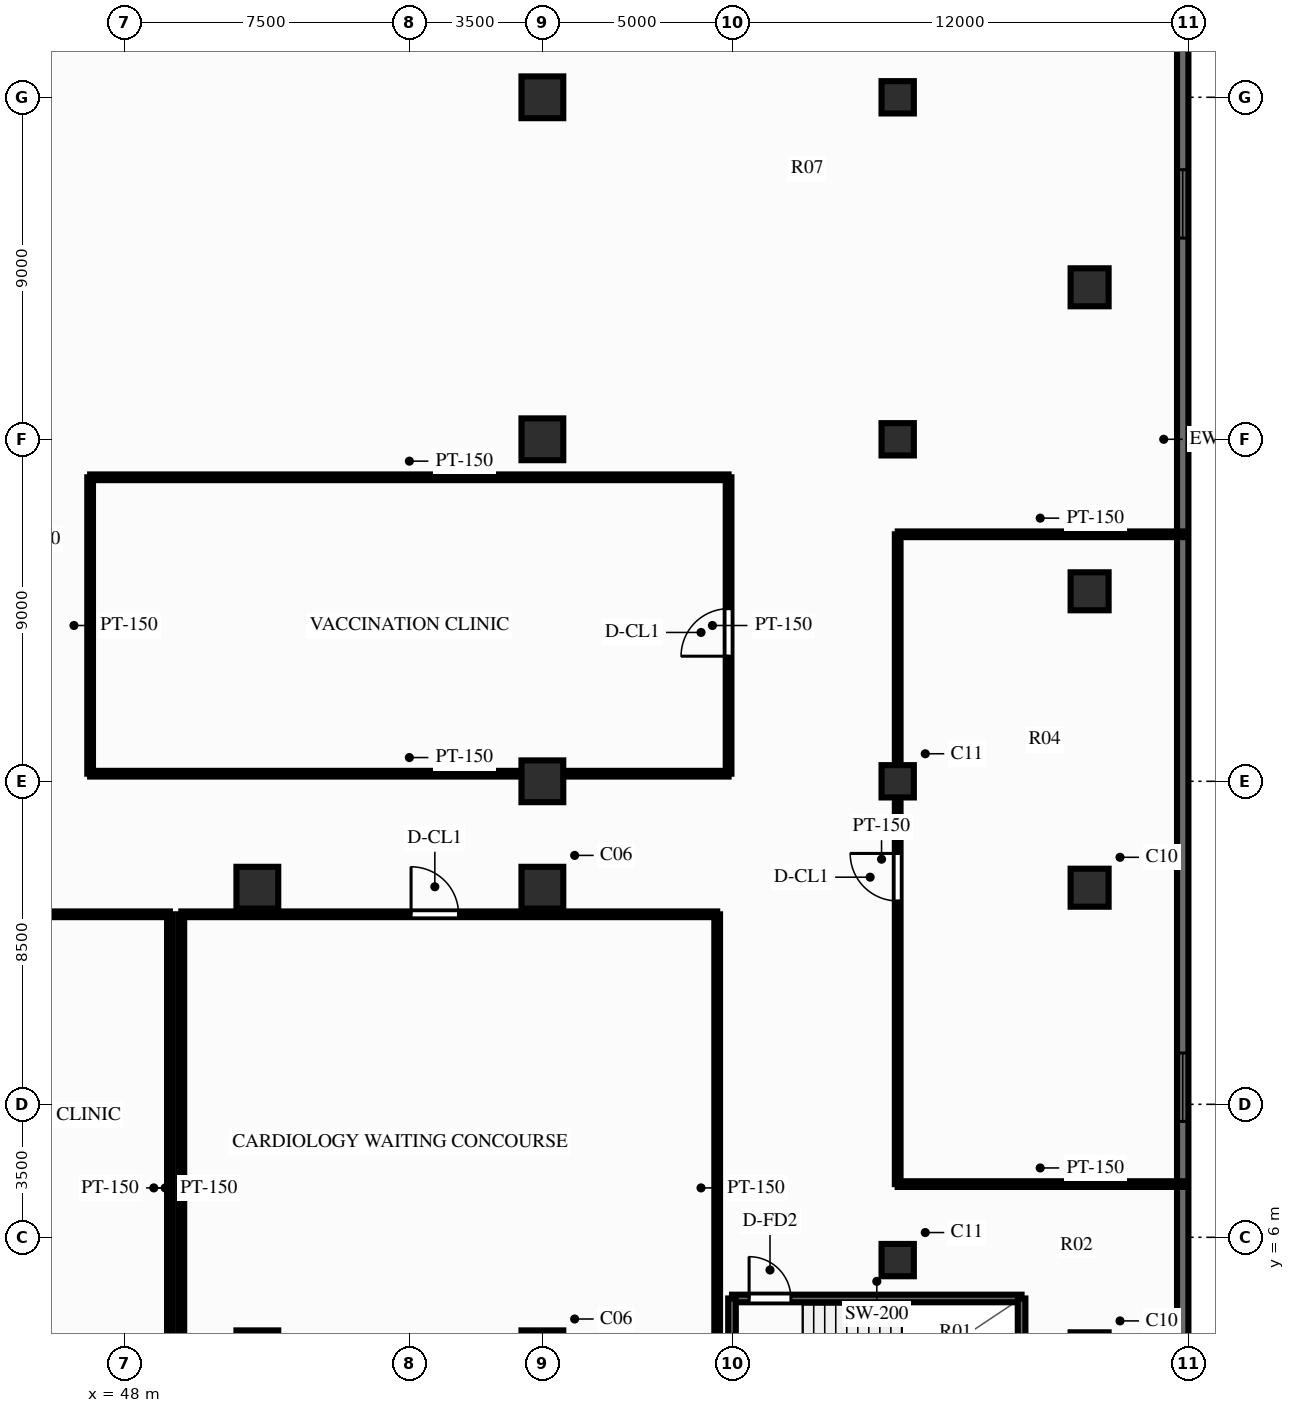
"""IFC4 building model, lengths in metres.
Left out: names, types, materials, properties, quantities, classifications, styles, units other than length and angle.
Written with IfcOpenShell. Run it as: python <this file> out.ifc"""

import sys

from ifc_helpers import new_model, si_unit, direction, frame, frame_2d, origin, origin_2d, place, context, subcontext, project, spatial, rectangle, circle, extrude, source, transform, mapped, element, fill, save


model = new_model("IFC4")
c1 = context("Model", 3, precision=1e-05, world=origin(), true_north=direction((0.0, 1.0)))
c2 = subcontext(c1, "Body", "Model", "MODEL_VIEW")
j1 = project(units=[si_unit("LENGTHUNIT", "METRE"), si_unit("PLANEANGLEUNIT", "RADIAN")], contexts=[c1])
p1 = place(None, origin())
s1 = spatial("IfcSite", under=j1, at=p1, CompositionType="ELEMENT")
p2 = place(p1, origin())
s2 = spatial("IfcBuilding", under=s1, at=p2, CompositionType="ELEMENT")
p3 = place(p2, frame((0.0, 0.0, 4.2)))
s3 = spatial("IfcBuildingStorey", under=s2, at=p3, CompositionType="ELEMENT", Elevation=4.2)
m1 = source(origin(), c2, "Body", "SweptSolid", [
    extrude(circle(Radius=0.5, at=origin_2d()), origin(), (0.0, 0.0, 1.0), 3.6),
])
for number, where, z_axis, x_axis in (
    (1, (73.4, 3.0, 0.0), (0.0, 0.0, 1.0), (1.0, 0.0, 0.0)),
    (2, (73.4, 15.2, 0.0), (0.0, 0.0, 1.0), (1.0, 0.0, 0.0)),
    (3, (73.4, 23.0, 0.0), (0.0, 0.0, 1.0), (1.0, 0.0, 0.0)),
    (4, (73.4, 31.0, 0.0), (0.0, 0.0, 1.0), (1.0, 0.0, 0.0)),
):
    element("IfcColumn", number, at=place(p3, frame(where, z_axis=z_axis, x_axis=x_axis)), inside=s3, PredefinedType="COLUMN", context=c2, shape_type="MappedRepresentation", body=[
        mapped(m1, transform((0.0, 0.0, 0.0), scale=1.0)),
    ])
m2 = source(origin(), c2, "Body", "SweptSolid", [
    extrude(circle(Radius=0.425, at=origin_2d()), origin(), (0.0, 0.0, 1.0), 3.6),
])
for number, where, z_axis, x_axis in (
    (5, (68.35, 5.4, 0.0), (0.0, 0.0, 1.0), (1.0, 0.0, 0.0)),
    (6, (68.35, 18.0, 0.0), (0.0, 0.0, 1.0), (1.0, 0.0, 0.0)),
    (7, (68.35, 27.0, 0.0), (0.0, 0.0, 1.0), (1.0, 0.0, 0.0)),
    (8, (68.35, 36.0, 0.0), (0.0, 0.0, 1.0), (1.0, 0.0, 0.0)),
):
    element("IfcColumn", number, at=place(p3, frame(where, z_axis=z_axis, x_axis=x_axis)), inside=s3, PredefinedType="COLUMN", context=c2, shape_type="MappedRepresentation", body=[
        mapped(m2, transform((0.0, 0.0, 0.0), scale=1.0)),
    ])
m3 = source(origin(), c2, "Body", "SweptSolid", [
    extrude(rectangle(XDim=1.1, YDim=1.1, at=origin_2d()), origin(), (0.0, 0.0, 1.0), 3.6),
])
for number, where, z_axis, x_axis in (
    (9, (59.0, 3.0, 0.0), (0.0, 0.0, 1.0), (1.0, 0.0, 0.0)),
    (10, (59.0, 15.2, 0.0), (0.0, 0.0, 1.0), (1.0, 0.0, 0.0)),
    (11, (59.0, 18.0, 0.0), (0.0, 0.0, 1.0), (1.0, 0.0, 0.0)),
    (12, (59.0, 27.0, 0.0), (0.0, 0.0, 1.0), (1.0, 0.0, 0.0)),
    (13, (59.0, 36.0, 0.0), (0.0, 0.0, 1.0), (1.0, 0.0, 0.0)),
    (14, (51.5, 3.0, 0.0), (0.0, 0.0, 1.0), (1.0, 0.0, 0.0)),
    (15, (51.5, 15.2, 0.0), (0.0, 0.0, 1.0), (1.0, 0.0, 0.0)),
):
    element("IfcColumn", number, at=place(p3, frame(where, z_axis=z_axis, x_axis=x_axis)), inside=s3, PredefinedType="COLUMN", context=c2, shape_type="MappedRepresentation", body=[
        mapped(m3, transform((0.0, 0.0, 0.0), scale=1.0)),
    ])
p4 = place(p3, frame((75.85, 0.0, 0.0), z_axis=(0.0, 0.0, 1.0), x_axis=(0.0, 1.0, 0.0)))
e16 = element("IfcWall", 16, at=p4, inside=s3, PredefinedType="SOLIDWALL", context=c2, shape_type="SweptSolid", body=[
    extrude(rectangle(XDim=54.0, YDim=0.3, at=frame_2d((27.0, 0.0))), origin(), (0.0, 0.0, 1.0), 2.88),
])
p5 = place(p4, frame((0.405, 0.0, 0.85)))
e17 = element("IfcOpeningElement", 17, at=p5, cuts=e16, PredefinedType="OPENING", context=c2, shape_type="SweptSolid", body=[
    extrude(rectangle(XDim=0.7, YDim=1.5, at=frame_2d((0.35, 0.75))), frame((0.0, 0.162, 0.0), z_axis=(0.0, -1.0, 0.0), x_axis=(1.0, 0.0, 0.0)), (0.0, 0.0, 1.0), 0.324),
])
p6 = place(p4, frame((9.05, 0.0, 0.85)))
e18 = element("IfcOpeningElement", 18, at=p6, cuts=e16, PredefinedType="OPENING", context=c2, shape_type="SweptSolid", body=[
    extrude(rectangle(XDim=1.8, YDim=1.65, at=frame_2d((0.9, 0.825))), frame((0.0, 0.162, 0.0), z_axis=(0.0, -1.0, 0.0), x_axis=(1.0, 0.0, 0.0)), (0.0, 0.0, 1.0), 0.324),
])
p7 = place(p4, frame((32.295, 0.0, 0.85)))
e19 = element("IfcOpeningElement", 19, at=p7, cuts=e16, PredefinedType="OPENING", context=c2, shape_type="SweptSolid", body=[
    extrude(rectangle(XDim=1.8, YDim=1.65, at=frame_2d((0.9, 0.825))), frame((0.0, 0.162, 0.0), z_axis=(0.0, -1.0, 0.0), x_axis=(1.0, 0.0, 0.0)), (0.0, 0.0, 1.0), 0.324),
])
p8 = place(p3, frame((63.99, 4.39, 0.0), z_axis=(0.0, 0.0, 1.0), x_axis=(1.0, 0.0, 0.0)))
e20 = element("IfcWall", 20, at=p8, inside=s3, PredefinedType="SOLIDWALL", context=c2, shape_type="SweptSolid", body=[
    extrude(rectangle(XDim=7.62, YDim=0.2, at=frame_2d((3.81, 0.0))), origin(), (0.0, 0.0, 1.0), 3.32),
])
p9 = place(p8, frame((0.45, 0.0, 0.0)))
e21 = element("IfcOpeningElement", 21, at=p9, cuts=e20, PredefinedType="OPENING", context=c2, shape_type="SweptSolid", body=[
    extrude(rectangle(XDim=1.1, YDim=2.15, at=frame_2d((0.55, 1.075))), frame((0.0, 0.112, 0.0), z_axis=(0.0, -1.0, 0.0), x_axis=(1.0, 0.0, 0.0)), (0.0, 0.0, 1.0), 0.224),
])
for number, where, z_axis, x_axis in (
    (22, (63.99, 0.69, 0.0), (0.0, 0.0, 1.0), (0.0, 1.0, 0.0)),
    (23, (71.61, 0.69, 0.0), (0.0, 0.0, 1.0), (0.0, 1.0, 0.0)),
):
    element("IfcWall", number, at=place(p3, frame(where, z_axis=z_axis, x_axis=x_axis)), inside=s3, PredefinedType="SOLIDWALL", context=c2, shape_type="SweptSolid", body=[
        extrude(rectangle(XDim=3.7, YDim=0.2, at=frame_2d((1.85, 0.0))), origin(), (0.0, 0.0, 1.0), 3.32),
    ])
p10 = place(p3, frame((39.7, 14.5, 0.0), z_axis=(0.0, 0.0, 1.0), x_axis=(1.0, 0.0, 0.0)))
e24 = element("IfcWall", 24, at=p10, inside=s3, PredefinedType="PARTITIONING", context=c2, shape_type="SweptSolid", body=[
    extrude(rectangle(XDim=9.5, YDim=0.15, at=frame_2d((4.75, 0.0))), origin(), (0.0, 0.0, 1.0), 3.32),
])
p11 = place(p10, frame((1.766, 0.0, 0.0)))
e25 = element("IfcOpeningElement", 25, at=p11, cuts=e24, PredefinedType="OPENING", context=c2, shape_type="SweptSolid", body=[
    extrude(rectangle(XDim=1.25, YDim=2.15, at=frame_2d((0.625, 1.075))), frame((0.0, 0.087, 0.0), z_axis=(0.0, -1.0, 0.0), x_axis=(1.0, 0.0, 0.0)), (0.0, 0.0, 1.0), 0.174),
])
p12 = place(p3, frame((49.2, 0.1, 0.0), z_axis=(0.0, 0.0, 1.0), x_axis=(0.0, 1.0, 0.0)))
e26 = element("IfcWall", 26, at=p12, inside=s3, PredefinedType="PARTITIONING", context=c2, shape_type="SweptSolid", body=[
    extrude(rectangle(XDim=14.4, YDim=0.15, at=frame_2d((7.2, 0.0))), origin(), (0.0, 0.0, 1.0), 3.32),
])
p13 = place(p3, frame((49.5, 14.5, 0.0), z_axis=(0.0, 0.0, 1.0), x_axis=(1.0, 0.0, 0.0)))
e27 = element("IfcWall", 27, at=p13, inside=s3, PredefinedType="PARTITIONING", context=c2, shape_type="SweptSolid", body=[
    extrude(rectangle(XDim=14.1, YDim=0.15, at=frame_2d((7.05, 0.0))), origin(), (0.0, 0.0, 1.0), 3.32),
])
p14 = place(p13, frame((6.045, 0.0, 0.0)))
e28 = element("IfcOpeningElement", 28, at=p14, cuts=e27, PredefinedType="OPENING", context=c2, shape_type="SweptSolid", body=[
    extrude(rectangle(XDim=1.25, YDim=2.15, at=frame_2d((0.625, 1.075))), frame((0.0, 0.087, 0.0), z_axis=(0.0, -1.0, 0.0), x_axis=(1.0, 0.0, 0.0)), (0.0, 0.0, 1.0), 0.174),
])
for number, where, z_axis, x_axis in (
    (29, (49.5, 0.1, 0.0), (0.0, 0.0, 1.0), (0.0, 1.0, 0.0)),
    (30, (63.6, 0.1, 0.0), (0.0, 0.0, 1.0), (0.0, 1.0, 0.0)),
):
    element("IfcWall", number, at=place(p3, frame(where, z_axis=z_axis, x_axis=x_axis)), inside=s3, PredefinedType="PARTITIONING", context=c2, shape_type="SweptSolid", body=[
        extrude(rectangle(XDim=14.4, YDim=0.15, at=frame_2d((7.2, 0.0))), origin(), (0.0, 0.0, 1.0), 3.32),
    ])
for number, where, z_axis, x_axis in (
    (31, (68.35, 7.4, 0.0), (0.0, 0.0, 1.0), (1.0, 0.0, 0.0)),
    (32, (68.35, 24.5, 0.0), (0.0, 0.0, 1.0), (1.0, 0.0, 0.0)),
):
    element("IfcWall", number, at=place(p3, frame(where, z_axis=z_axis, x_axis=x_axis)), inside=s3, PredefinedType="PARTITIONING", context=c2, shape_type="SweptSolid", body=[
        extrude(rectangle(XDim=7.5, YDim=0.15, at=frame_2d((3.75, 0.0))), origin(), (0.0, 0.0, 1.0), 3.32),
    ])
p15 = place(p3, frame((68.35, 7.4, 0.0), z_axis=(0.0, 0.0, 1.0), x_axis=(0.0, 1.0, 0.0)))
e33 = element("IfcWall", 33, at=p15, inside=s3, PredefinedType="PARTITIONING", context=c2, shape_type="SweptSolid", body=[
    extrude(rectangle(XDim=17.1, YDim=0.15, at=frame_2d((8.55, 0.0))), origin(), (0.0, 0.0, 1.0), 2.84),
])
p16 = place(p15, frame((7.452, 0.0, 0.0)))
e34 = element("IfcOpeningElement", 34, at=p16, cuts=e33, PredefinedType="OPENING", context=c2, shape_type="SweptSolid", body=[
    extrude(rectangle(XDim=1.25, YDim=2.15, at=frame_2d((0.625, 1.075))), frame((0.0, 0.087, 0.0), z_axis=(0.0, -1.0, 0.0), x_axis=(1.0, 0.0, 0.0)), (0.0, 0.0, 1.0), 0.174),
])
for number, where, z_axis, x_axis in (
    (35, (47.1, 18.2, 0.0), (0.0, 0.0, 1.0), (1.0, 0.0, 0.0)),
    (36, (47.1, 26.0, 0.0), (0.0, 0.0, 1.0), (1.0, 0.0, 0.0)),
):
    element("IfcWall", number, at=place(p3, frame(where, z_axis=z_axis, x_axis=x_axis)), inside=s3, PredefinedType="PARTITIONING", context=c2, shape_type="SweptSolid", body=[
        extrude(rectangle(XDim=16.8, YDim=0.15, at=frame_2d((8.4, 0.0))), origin(), (0.0, 0.0, 1.0), 3.32),
    ])
p17 = place(p3, frame((47.1, 18.2, 0.0), z_axis=(0.0, 0.0, 1.0), x_axis=(0.0, 1.0, 0.0)))
e37 = element("IfcWall", 37, at=p17, inside=s3, PredefinedType="PARTITIONING", context=c2, shape_type="SweptSolid", body=[
    extrude(rectangle(XDim=7.8, YDim=0.15, at=frame_2d((3.9, 0.0))), origin(), (0.0, 0.0, 1.0), 3.32),
])
p18 = place(p3, frame((63.9, 18.2, 0.0), z_axis=(0.0, 0.0, 1.0), x_axis=(0.0, 1.0, 0.0)))
e38 = element("IfcWall", 38, at=p18, inside=s3, PredefinedType="PARTITIONING", context=c2, shape_type="SweptSolid", body=[
    extrude(rectangle(XDim=7.8, YDim=0.15, at=frame_2d((3.9, 0.0))), origin(), (0.0, 0.0, 1.0), 3.32),
])
p19 = place(p18, frame((3.092, 0.0, 0.0)))
e39 = element("IfcOpeningElement", 39, at=p19, cuts=e38, PredefinedType="OPENING", context=c2, shape_type="SweptSolid", body=[
    extrude(rectangle(XDim=1.25, YDim=2.15, at=frame_2d((0.625, 1.075))), frame((0.0, 0.087, 0.0), z_axis=(0.0, -1.0, 0.0), x_axis=(1.0, 0.0, 0.0)), (0.0, 0.0, 1.0), 0.174),
])
m4 = source(origin(), c2, "Body", "SweptSolid", [
    extrude(rectangle(XDim=1.8, YDim=1.65, at=frame_2d((0.9, 0.825))), frame((0.0, 0.03, 0.0), z_axis=(0.0, -1.0, 0.0), x_axis=(1.0, 0.0, 0.0)), (0.0, 0.0, 1.0), 0.06),
])
p20 = place(p6, origin())
e40 = element("IfcWindow", 40, at=p20, inside=s3, PartitioningType="SINGLE_PANEL", PredefinedType="WINDOW", context=c2, shape_type="MappedRepresentation", body=[
    mapped(m4, transform((0.0, 0.0, 0.0), scale=1.0)),
])
fill(e18, e40)
p21 = place(p7, origin())
e41 = element("IfcWindow", 41, at=p21, inside=s3, PartitioningType="SINGLE_PANEL", PredefinedType="WINDOW", context=c2, shape_type="MappedRepresentation", body=[
    mapped(m4, transform((0.0, 0.0, 0.0), scale=1.0)),
])
fill(e19, e41)
m5 = source(origin(), c2, "Body", "SweptSolid", [
    extrude(rectangle(XDim=1.1, YDim=2.15, at=frame_2d((0.55, 1.075))), frame((0.0, 0.025, 0.0), z_axis=(0.0, -1.0, 0.0), x_axis=(1.0, 0.0, 0.0)), (0.0, 0.0, 1.0), 0.05),
])
p22 = place(p9, origin())
e42 = element("IfcDoor", 42, at=p22, inside=s3, OperationType="SINGLE_SWING_LEFT", PredefinedType="DOOR", context=c2, shape_type="MappedRepresentation", body=[
    mapped(m5, transform((0.0, 0.0, 0.0), scale=1.0)),
])
fill(e21, e42)
m6 = source(origin(), c2, "Body", "SweptSolid", [
    extrude(rectangle(XDim=1.25, YDim=2.15, at=frame_2d((0.625, 1.075))), frame((0.0, 0.025, 0.0), z_axis=(0.0, -1.0, 0.0), x_axis=(1.0, 0.0, 0.0)), (0.0, 0.0, 1.0), 0.05),
])
p23 = place(p14, origin())
e43 = element("IfcDoor", 43, at=p23, inside=s3, OperationType="SINGLE_SWING_LEFT", PredefinedType="DOOR", context=c2, shape_type="MappedRepresentation", body=[
    mapped(m6, transform((0.0, 0.0, 0.0), scale=1.0)),
])
fill(e28, e43)
p24 = place(p16, origin())
e44 = element("IfcDoor", 44, at=p24, inside=s3, OperationType="SINGLE_SWING_RIGHT", PredefinedType="DOOR", context=c2, shape_type="MappedRepresentation", body=[
    mapped(m6, transform((0.0, 0.0, 0.0), scale=1.0)),
])
fill(e34, e44)
p25 = place(p19, origin())
e45 = element("IfcDoor", 45, at=p25, inside=s3, OperationType="SINGLE_SWING_LEFT", PredefinedType="DOOR", context=c2, shape_type="MappedRepresentation", body=[
    mapped(m6, transform((0.0, 0.0, 0.0), scale=1.0)),
])
fill(e39, e45)
save(model, sys.argv[1])
